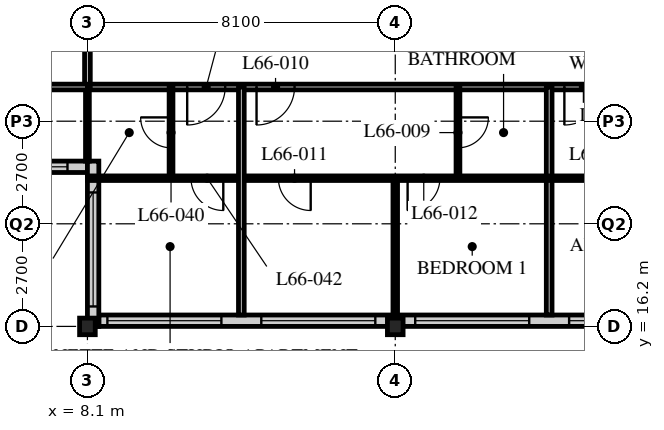
"""IFC4 building model, lengths in metres.
Left out: names, types, materials, properties, quantities, classifications, styles, units other than length and angle.
Written with IfcOpenShell. Run it as: python <this file> out.ifc"""

import sys

from ifc_helpers import new_model, si_unit, direction, frame, frame_2d, origin, origin_2d, place, context, subcontext, project, spatial, rectangle, i_section, extrude, element, fill, save


model = new_model("IFC4")
c1 = context("Model", 3, precision=1e-05, world=origin(), true_north=direction((0.0, 1.0)))
c2 = subcontext(c1, "Body", "Model", "MODEL_VIEW")
j1 = project(units=[si_unit("LENGTHUNIT", "METRE"), si_unit("PLANEANGLEUNIT", "RADIAN")], contexts=[c1])
p1 = place(None, origin())
s1 = spatial("IfcSite", under=j1, at=p1, CompositionType="ELEMENT")
p2 = place(p1, origin())
s2 = spatial("IfcBuilding", under=s1, at=p2, CompositionType="ELEMENT")
p3 = place(p2, frame((0.0, 0.0, 258.0)))
s3 = spatial("IfcBuildingStorey", under=s2, at=p3, CompositionType="ELEMENT", Elevation=258.0)
for number, where, z_axis, x_axis in (
    (1, (8.1, 16.2, 0.0), (0.0, 0.0, 1.0), (1.0, 0.0, 0.0)),
    (2, (16.2, 16.2, 0.0), (0.0, 0.0, 1.0), (1.0, 0.0, 0.0)),
):
    element("IfcColumn", number, at=place(p3, frame(where, z_axis=z_axis, x_axis=x_axis)), inside=s3, PredefinedType="COLUMN", context=c2, shape_type="SweptSolid", body=[
        extrude(i_section(OverallWidth=0.412, OverallDepth=0.437, WebThickness=0.036, FlangeThickness=0.058, FilletRadius=0.015, at=origin_2d()), origin(), (0.0, 0.0, 1.0), 3.9),
    ])
p4 = place(p3, frame((8.4, 16.35, 0.0), z_axis=(0.0, 0.0, 1.0), x_axis=(1.0, 0.0, 0.0)))
e3 = element("IfcWall", 3, at=p4, inside=s3, PredefinedType="SOLIDWALL", context=c2, shape_type="SweptSolid", body=[
    extrude(rectangle(XDim=40.2, YDim=0.3, at=frame_2d((20.1, 0.0))), origin(), (0.0, 0.0, 1.0), 3.69),
])
p5 = place(p4, frame((0.225, 0.0, 0.6)))
e4 = element("IfcOpeningElement", 4, at=p5, cuts=e3, PredefinedType="OPENING", context=c2, shape_type="SweptSolid", body=[
    extrude(rectangle(XDim=3.0, YDim=2.4, at=frame_2d((1.5, 1.2))), frame((0.0, 0.16, 0.0), z_axis=(0.0, -1.0, 0.0), x_axis=(1.0, 0.0, 0.0)), (0.0, 0.0, 1.0), 0.32),
])
p6 = place(p4, frame((4.275, 0.0, 0.6)))
e5 = element("IfcOpeningElement", 5, at=p6, cuts=e3, PredefinedType="OPENING", context=c2, shape_type="SweptSolid", body=[
    extrude(rectangle(XDim=3.0, YDim=2.4, at=frame_2d((1.5, 1.2))), frame((0.0, 0.16, 0.0), z_axis=(0.0, -1.0, 0.0), x_axis=(1.0, 0.0, 0.0)), (0.0, 0.0, 1.0), 0.32),
])
p7 = place(p4, frame((8.325, 0.0, 0.6)))
e6 = element("IfcOpeningElement", 6, at=p7, cuts=e3, PredefinedType="OPENING", context=c2, shape_type="SweptSolid", body=[
    extrude(rectangle(XDim=3.0, YDim=2.4, at=frame_2d((1.5, 1.2))), frame((0.0, 0.16, 0.0), z_axis=(0.0, -1.0, 0.0), x_axis=(1.0, 0.0, 0.0)), (0.0, 0.0, 1.0), 0.32),
])
p8 = place(p4, frame((12.375, 0.0, 0.6)))
e7 = element("IfcOpeningElement", 7, at=p8, cuts=e3, PredefinedType="OPENING", context=c2, shape_type="SweptSolid", body=[
    extrude(rectangle(XDim=3.0, YDim=2.4, at=frame_2d((1.5, 1.2))), frame((0.0, 0.16, 0.0), z_axis=(0.0, -1.0, 0.0), x_axis=(1.0, 0.0, 0.0)), (0.0, 0.0, 1.0), 0.32),
])
p9 = place(p4, frame((16.425, 0.0, 0.6)))
e8 = element("IfcOpeningElement", 8, at=p9, cuts=e3, PredefinedType="OPENING", context=c2, shape_type="SweptSolid", body=[
    extrude(rectangle(XDim=3.0, YDim=2.4, at=frame_2d((1.5, 1.2))), frame((0.0, 0.16, 0.0), z_axis=(0.0, -1.0, 0.0), x_axis=(1.0, 0.0, 0.0)), (0.0, 0.0, 1.0), 0.32),
])
p10 = place(p4, frame((20.475, 0.0, 0.6)))
e9 = element("IfcOpeningElement", 9, at=p10, cuts=e3, PredefinedType="OPENING", context=c2, shape_type="SweptSolid", body=[
    extrude(rectangle(XDim=3.0, YDim=2.4, at=frame_2d((1.5, 1.2))), frame((0.0, 0.16, 0.0), z_axis=(0.0, -1.0, 0.0), x_axis=(1.0, 0.0, 0.0)), (0.0, 0.0, 1.0), 0.32),
])
p11 = place(p4, frame((24.525, 0.0, 0.6)))
e10 = element("IfcOpeningElement", 10, at=p11, cuts=e3, PredefinedType="OPENING", context=c2, shape_type="SweptSolid", body=[
    extrude(rectangle(XDim=3.0, YDim=2.4, at=frame_2d((1.5, 1.2))), frame((0.0, 0.16, 0.0), z_axis=(0.0, -1.0, 0.0), x_axis=(1.0, 0.0, 0.0)), (0.0, 0.0, 1.0), 0.32),
])
p12 = place(p4, frame((28.575, 0.0, 0.6)))
e11 = element("IfcOpeningElement", 11, at=p12, cuts=e3, PredefinedType="OPENING", context=c2, shape_type="SweptSolid", body=[
    extrude(rectangle(XDim=3.0, YDim=2.4, at=frame_2d((1.5, 1.2))), frame((0.0, 0.16, 0.0), z_axis=(0.0, -1.0, 0.0), x_axis=(1.0, 0.0, 0.0)), (0.0, 0.0, 1.0), 0.32),
])
p13 = place(p4, frame((32.625, 0.0, 0.6)))
e12 = element("IfcOpeningElement", 12, at=p13, cuts=e3, PredefinedType="OPENING", context=c2, shape_type="SweptSolid", body=[
    extrude(rectangle(XDim=3.0, YDim=2.4, at=frame_2d((1.5, 1.2))), frame((0.0, 0.16, 0.0), z_axis=(0.0, -1.0, 0.0), x_axis=(1.0, 0.0, 0.0)), (0.0, 0.0, 1.0), 0.32),
])
p14 = place(p4, frame((36.675, 0.0, 0.6)))
e13 = element("IfcOpeningElement", 13, at=p14, cuts=e3, PredefinedType="OPENING", context=c2, shape_type="SweptSolid", body=[
    extrude(rectangle(XDim=3.0, YDim=2.4, at=frame_2d((1.5, 1.2))), frame((0.0, 0.16, 0.0), z_axis=(0.0, -1.0, 0.0), x_axis=(1.0, 0.0, 0.0)), (0.0, 0.0, 1.0), 0.32),
])
p15 = place(p3, frame((4.35, 20.4, 0.0), z_axis=(0.0, 0.0, 1.0), x_axis=(1.0, 0.0, 0.0)))
e14 = element("IfcWall", 14, at=p15, inside=s3, PredefinedType="SOLIDWALL", context=c2, shape_type="SweptSolid", body=[
    extrude(rectangle(XDim=3.75, YDim=0.3, at=frame_2d((1.875, 0.0))), origin(), (0.0, 0.0, 1.0), 3.69),
])
p16 = place(p15, frame((0.225, 0.0, 0.6)))
e15 = element("IfcOpeningElement", 15, at=p16, cuts=e14, PredefinedType="OPENING", context=c2, shape_type="SweptSolid", body=[
    extrude(rectangle(XDim=3.0, YDim=2.3, at=frame_2d((1.5, 1.15))), frame((0.0, 0.16, 0.0), z_axis=(0.0, -1.0, 0.0), x_axis=(1.0, 0.0, 0.0)), (0.0, 0.0, 1.0), 0.32),
])
p17 = place(p3, frame((8.25, 20.55, 0.0), z_axis=(0.0, 0.0, 1.0), x_axis=(0.0, -1.0, 0.0)))
e16 = element("IfcWall", 16, at=p17, inside=s3, PredefinedType="SOLIDWALL", context=c2, shape_type="SweptSolid", body=[
    extrude(rectangle(XDim=4.35, YDim=0.3, at=frame_2d((2.175, 0.0))), origin(), (0.0, 0.0, 1.0), 3.69),
])
p18 = place(p17, frame((0.825, 0.0, 0.6)))
e17 = element("IfcOpeningElement", 17, at=p18, cuts=e16, PredefinedType="OPENING", context=c2, shape_type="SweptSolid", body=[
    extrude(rectangle(XDim=3.0, YDim=2.3, at=frame_2d((1.5, 1.15))), frame((0.0, 0.16, 0.0), z_axis=(0.0, -1.0, 0.0), x_axis=(1.0, 0.0, 0.0)), (0.0, 0.0, 1.0), 0.32),
])
p19 = place(p3, frame((8.1, 22.5, 0.0), z_axis=(0.0, 0.0, 1.0), x_axis=(1.0, 0.0, 0.0)))
e18 = element("IfcWall", 18, at=p19, inside=s3, PredefinedType="PARTITIONING", context=c2, shape_type="SweptSolid", body=[
    extrude(rectangle(XDim=28.35, YDim=0.15, at=frame_2d((14.175, 0.0))), origin(), (0.0, 0.0, 1.0), 3.69),
])
p20 = place(p19, frame((4.45, 0.0, 0.0)))
e19 = element("IfcOpeningElement", 19, at=p20, cuts=e18, PredefinedType="OPENING", context=c2, shape_type="SweptSolid", body=[
    extrude(rectangle(XDim=1.0, YDim=2.1, at=frame_2d((0.5, 1.05))), frame((0.0, 0.085, 0.0), z_axis=(0.0, -1.0, 0.0), x_axis=(1.0, 0.0, 0.0)), (0.0, 0.0, 1.0), 0.17),
])
p21 = place(p19, frame((12.55, 0.0, 0.0)))
e20 = element("IfcOpeningElement", 20, at=p21, cuts=e18, PredefinedType="OPENING", context=c2, shape_type="SweptSolid", body=[
    extrude(rectangle(XDim=1.0, YDim=2.1, at=frame_2d((0.5, 1.05))), frame((0.0, 0.085, 0.0), z_axis=(0.0, -1.0, 0.0), x_axis=(1.0, 0.0, 0.0)), (0.0, 0.0, 1.0), 0.17),
])
p22 = place(p19, frame((20.65, 0.0, 0.0)))
e21 = element("IfcOpeningElement", 21, at=p22, cuts=e18, PredefinedType="OPENING", context=c2, shape_type="SweptSolid", body=[
    extrude(rectangle(XDim=1.0, YDim=2.1, at=frame_2d((0.5, 1.05))), frame((0.0, 0.085, 0.0), z_axis=(0.0, -1.0, 0.0), x_axis=(1.0, 0.0, 0.0)), (0.0, 0.0, 1.0), 0.17),
])
p23 = place(p19, frame((2.625, 0.0, 0.0)))
e22 = element("IfcOpeningElement", 22, at=p23, cuts=e18, PredefinedType="OPENING", context=c2, shape_type="SweptSolid", body=[
    extrude(rectangle(XDim=1.0, YDim=2.1, at=frame_2d((0.5, 1.05))), frame((0.0, 0.085, 0.0), z_axis=(0.0, -1.0, 0.0), x_axis=(1.0, 0.0, 0.0)), (0.0, 0.0, 1.0), 0.17),
])
p24 = place(p3, frame((8.1, 22.5, 0.0), z_axis=(0.0, 0.0, 1.0), x_axis=(0.0, 1.0, 0.0)))
e23 = element("IfcWall", 23, at=p24, inside=s3, PredefinedType="PARTITIONING", context=c2, shape_type="SweptSolid", body=[
    extrude(rectangle(XDim=26.1, YDim=0.15, at=frame_2d((13.05, 0.0))), origin(), (0.0, 0.0, 1.0), 3.078),
])
p25 = place(p24, frame((2.65, 0.0, 0.0)))
e24 = element("IfcOpeningElement", 24, at=p25, cuts=e23, PredefinedType="OPENING", context=c2, shape_type="SweptSolid", body=[
    extrude(rectangle(XDim=1.0, YDim=2.1, at=frame_2d((0.5, 1.05))), frame((0.0, 0.085, 0.0), z_axis=(0.0, -1.0, 0.0), x_axis=(1.0, 0.0, 0.0)), (0.0, 0.0, 1.0), 0.17),
])
p26 = place(p24, frame((22.75, 0.0, 0.0)))
e25 = element("IfcOpeningElement", 25, at=p26, cuts=e23, PredefinedType="OPENING", context=c2, shape_type="SweptSolid", body=[
    extrude(rectangle(XDim=1.0, YDim=2.1, at=frame_2d((0.5, 1.05))), frame((0.0, 0.085, 0.0), z_axis=(0.0, -1.0, 0.0), x_axis=(1.0, 0.0, 0.0)), (0.0, 0.0, 1.0), 0.17),
])
p27 = place(p3, frame((17.85, 22.5, 0.0), z_axis=(0.0, 0.0, 1.0), x_axis=(0.0, -1.0, 0.0)))
e26 = element("IfcWall", 26, at=p27, inside=s3, PredefinedType="PARTITIONING", context=c2, shape_type="SweptSolid", body=[
    extrude(rectangle(XDim=2.4, YDim=0.1, at=frame_2d((1.2, 0.0))), origin(), (0.0, 0.0, 1.0), 3.69),
])
p28 = place(p27, frame((0.8, 0.0, 0.0)))
e27 = element("IfcOpeningElement", 27, at=p28, cuts=e26, PredefinedType="OPENING", context=c2, shape_type="SweptSolid", body=[
    extrude(rectangle(XDim=0.8, YDim=2.1, at=frame_2d((0.4, 1.05))), frame((0.0, 0.06, 0.0), z_axis=(0.0, -1.0, 0.0), x_axis=(1.0, 0.0, 0.0)), (0.0, 0.0, 1.0), 0.12),
])
p29 = place(p3, frame((16.2, 20.1, 0.0), z_axis=(0.0, 0.0, 1.0), x_axis=(0.0, -1.0, 0.0)))
e28 = element("IfcWall", 28, at=p29, inside=s3, PredefinedType="PARTITIONING", context=c2, shape_type="SweptSolid", body=[
    extrude(rectangle(XDim=3.6, YDim=0.12, at=frame_2d((1.8, 0.0))), origin(), (0.0, 0.0, 1.0), 3.078),
])
p30 = place(p3, frame((20.25, 22.5, 0.0), z_axis=(0.0, 0.0, 1.0), x_axis=(0.0, -1.0, 0.0)))
e29 = element("IfcWall", 29, at=p30, inside=s3, PredefinedType="PARTITIONING", context=c2, shape_type="SweptSolid", body=[
    extrude(rectangle(XDim=6.0, YDim=0.15, at=frame_2d((3.0, 0.0))), origin(), (0.0, 0.0, 1.0), 3.69),
])
p31 = place(p3, frame((8.1, 20.1, 0.0), z_axis=(0.0, 0.0, 1.0), x_axis=(1.0, 0.0, 0.0)))
e30 = element("IfcWall", 30, at=p31, inside=s3, PredefinedType="PARTITIONING", context=c2, shape_type="SweptSolid", body=[
    extrude(rectangle(XDim=28.35, YDim=0.12, at=frame_2d((14.175, 0.0))), origin(), (0.0, 0.0, 1.0), 3.69),
])
p32 = place(p31, frame((5.025, 0.0, 0.0)))
e31 = element("IfcOpeningElement", 31, at=p32, cuts=e30, PredefinedType="OPENING", context=c2, shape_type="SweptSolid", body=[
    extrude(rectangle(XDim=0.85, YDim=2.1, at=frame_2d((0.425, 1.05))), frame((0.0, 0.07, 0.0), z_axis=(0.0, -1.0, 0.0), x_axis=(1.0, 0.0, 0.0)), (0.0, 0.0, 1.0), 0.14),
])
p33 = place(p31, frame((8.425, 0.0, 0.0)))
e32 = element("IfcOpeningElement", 32, at=p33, cuts=e30, PredefinedType="OPENING", context=c2, shape_type="SweptSolid", body=[
    extrude(rectangle(XDim=0.85, YDim=2.1, at=frame_2d((0.425, 1.05))), frame((0.0, 0.07, 0.0), z_axis=(0.0, -1.0, 0.0), x_axis=(1.0, 0.0, 0.0)), (0.0, 0.0, 1.0), 0.14),
])
p34 = place(p31, frame((13.125, 0.0, 0.0)))
e33 = element("IfcOpeningElement", 33, at=p34, cuts=e30, PredefinedType="OPENING", context=c2, shape_type="SweptSolid", body=[
    extrude(rectangle(XDim=0.85, YDim=2.1, at=frame_2d((0.425, 1.05))), frame((0.0, 0.07, 0.0), z_axis=(0.0, -1.0, 0.0), x_axis=(1.0, 0.0, 0.0)), (0.0, 0.0, 1.0), 0.14),
])
p35 = place(p31, frame((16.525, 0.0, 0.0)))
e34 = element("IfcOpeningElement", 34, at=p35, cuts=e30, PredefinedType="OPENING", context=c2, shape_type="SweptSolid", body=[
    extrude(rectangle(XDim=0.85, YDim=2.1, at=frame_2d((0.425, 1.05))), frame((0.0, 0.07, 0.0), z_axis=(0.0, -1.0, 0.0), x_axis=(1.0, 0.0, 0.0)), (0.0, 0.0, 1.0), 0.14),
])
p36 = place(p31, frame((21.225, 0.0, 0.0)))
e35 = element("IfcOpeningElement", 35, at=p36, cuts=e30, PredefinedType="OPENING", context=c2, shape_type="SweptSolid", body=[
    extrude(rectangle(XDim=0.85, YDim=2.1, at=frame_2d((0.425, 1.05))), frame((0.0, 0.07, 0.0), z_axis=(0.0, -1.0, 0.0), x_axis=(1.0, 0.0, 0.0)), (0.0, 0.0, 1.0), 0.14),
])
p37 = place(p31, frame((24.625, 0.0, 0.0)))
e36 = element("IfcOpeningElement", 36, at=p37, cuts=e30, PredefinedType="OPENING", context=c2, shape_type="SweptSolid", body=[
    extrude(rectangle(XDim=0.85, YDim=2.1, at=frame_2d((0.425, 1.05))), frame((0.0, 0.07, 0.0), z_axis=(0.0, -1.0, 0.0), x_axis=(1.0, 0.0, 0.0)), (0.0, 0.0, 1.0), 0.14),
])
p38 = place(p31, frame((2.725, 0.0, 0.0)))
e37 = element("IfcOpeningElement", 37, at=p38, cuts=e30, PredefinedType="OPENING", context=c2, shape_type="SweptSolid", body=[
    extrude(rectangle(XDim=0.85, YDim=2.1, at=frame_2d((0.425, 1.05))), frame((0.0, 0.07, 0.0), z_axis=(0.0, -1.0, 0.0), x_axis=(1.0, 0.0, 0.0)), (0.0, 0.0, 1.0), 0.14),
])
p39 = place(p3, frame((10.3, 22.5, 0.0), z_axis=(0.0, 0.0, 1.0), x_axis=(0.0, -1.0, 0.0)))
e38 = element("IfcWall", 38, at=p39, inside=s3, PredefinedType="PARTITIONING", context=c2, shape_type="SweptSolid", body=[
    extrude(rectangle(XDim=2.4, YDim=0.1, at=frame_2d((1.2, 0.0))), origin(), (0.0, 0.0, 1.0), 3.69),
])
p40 = place(p39, frame((0.8, 0.0, 0.0)))
e39 = element("IfcOpeningElement", 39, at=p40, cuts=e38, PredefinedType="OPENING", context=c2, shape_type="SweptSolid", body=[
    extrude(rectangle(XDim=0.8, YDim=2.1, at=frame_2d((0.4, 1.05))), frame((0.0, 0.06, 0.0), z_axis=(0.0, -1.0, 0.0), x_axis=(1.0, 0.0, 0.0)), (0.0, 0.0, 1.0), 0.12),
])
p41 = place(p3, frame((8.1, 22.5, 0.0), z_axis=(0.0, 0.0, 1.0), x_axis=(0.0, -1.0, 0.0)))
e40 = element("IfcWall", 40, at=p41, inside=s3, PredefinedType="PARTITIONING", context=c2, shape_type="SweptSolid", body=[
    extrude(rectangle(XDim=1.95, YDim=0.1, at=frame_2d((0.975, 0.0))), origin(), (0.0, 0.0, 1.0), 3.078),
])
p42 = place(p3, frame((4.35, 22.5, 0.0), z_axis=(0.0, 0.0, 1.0), x_axis=(1.0, 0.0, 0.0)))
e41 = element("IfcWall", 41, at=p42, inside=s3, PredefinedType="PARTITIONING", context=c2, shape_type="SweptSolid", body=[
    extrude(rectangle(XDim=3.75, YDim=0.15, at=frame_2d((1.875, 0.0))), origin(), (0.0, 0.0, 1.0), 3.69),
])
p43 = place(p3, frame((12.15, 22.5, 0.0), z_axis=(0.0, 0.0, 1.0), x_axis=(0.0, -1.0, 0.0)))
e42 = element("IfcWall", 42, at=p43, inside=s3, PredefinedType="PARTITIONING", context=c2, shape_type="SweptSolid", body=[
    extrude(rectangle(XDim=6.0, YDim=0.15, at=frame_2d((3.0, 0.0))), origin(), (0.0, 0.0, 1.0), 3.69),
])
p44 = place(p5, origin())
e43 = element("IfcWindow", 43, at=p44, inside=s3, PartitioningType="SINGLE_PANEL", PredefinedType="WINDOW", context=c2, shape_type="SweptSolid", body=[
    extrude(rectangle(XDim=3.0, YDim=2.4, at=frame_2d((1.5, 1.2))), frame((0.0, 0.03, 0.0), z_axis=(0.0, -1.0, 0.0), x_axis=(1.0, 0.0, 0.0)), (0.0, 0.0, 1.0), 0.06),
])
fill(e4, e43)
p45 = place(p6, origin())
e44 = element("IfcWindow", 44, at=p45, inside=s3, PartitioningType="SINGLE_PANEL", PredefinedType="WINDOW", context=c2, shape_type="SweptSolid", body=[
    extrude(rectangle(XDim=3.0, YDim=2.4, at=frame_2d((1.5, 1.2))), frame((0.0, 0.03, 0.0), z_axis=(0.0, -1.0, 0.0), x_axis=(1.0, 0.0, 0.0)), (0.0, 0.0, 1.0), 0.06),
])
fill(e5, e44)
p46 = place(p7, origin())
e45 = element("IfcWindow", 45, at=p46, inside=s3, PartitioningType="SINGLE_PANEL", PredefinedType="WINDOW", context=c2, shape_type="SweptSolid", body=[
    extrude(rectangle(XDim=3.0, YDim=2.4, at=frame_2d((1.5, 1.2))), frame((0.0, 0.03, 0.0), z_axis=(0.0, -1.0, 0.0), x_axis=(1.0, 0.0, 0.0)), (0.0, 0.0, 1.0), 0.06),
])
fill(e6, e45)
p47 = place(p8, origin())
e46 = element("IfcWindow", 46, at=p47, inside=s3, PartitioningType="SINGLE_PANEL", PredefinedType="WINDOW", context=c2, shape_type="SweptSolid", body=[
    extrude(rectangle(XDim=3.0, YDim=2.4, at=frame_2d((1.5, 1.2))), frame((0.0, 0.03, 0.0), z_axis=(0.0, -1.0, 0.0), x_axis=(1.0, 0.0, 0.0)), (0.0, 0.0, 1.0), 0.06),
])
fill(e7, e46)
p48 = place(p16, origin())
e47 = element("IfcWindow", 47, at=p48, inside=s3, PartitioningType="SINGLE_PANEL", PredefinedType="WINDOW", context=c2, shape_type="SweptSolid", body=[
    extrude(rectangle(XDim=3.0, YDim=2.3, at=frame_2d((1.5, 1.15))), frame((0.0, 0.03, 0.0), z_axis=(0.0, -1.0, 0.0), x_axis=(1.0, 0.0, 0.0)), (0.0, 0.0, 1.0), 0.06),
])
fill(e15, e47)
p49 = place(p18, origin())
e48 = element("IfcWindow", 48, at=p49, inside=s3, PartitioningType="SINGLE_PANEL", PredefinedType="WINDOW", context=c2, shape_type="SweptSolid", body=[
    extrude(rectangle(XDim=3.0, YDim=2.3, at=frame_2d((1.5, 1.15))), frame((0.0, 0.03, 0.0), z_axis=(0.0, -1.0, 0.0), x_axis=(1.0, 0.0, 0.0)), (0.0, 0.0, 1.0), 0.06),
])
fill(e17, e48)
p50 = place(p28, origin())
e49 = element("IfcDoor", 49, at=p50, inside=s3, OperationType="SINGLE_SWING_LEFT", PredefinedType="DOOR", context=c2, shape_type="SweptSolid", body=[
    extrude(rectangle(XDim=0.8, YDim=2.1, at=frame_2d((0.4, 1.05))), frame((0.0, 0.025, 0.0), z_axis=(0.0, -1.0, 0.0), x_axis=(1.0, 0.0, 0.0)), (0.0, 0.0, 1.0), 0.05),
])
fill(e27, e49)
p51 = place(p20, origin())
e50 = element("IfcDoor", 50, at=p51, inside=s3, OperationType="SINGLE_SWING_RIGHT", PredefinedType="DOOR", context=c2, shape_type="SweptSolid", body=[
    extrude(rectangle(XDim=1.0, YDim=2.1, at=frame_2d((0.5, 1.05))), frame((0.0, 0.025, 0.0), z_axis=(0.0, -1.0, 0.0), x_axis=(1.0, 0.0, 0.0)), (0.0, 0.0, 1.0), 0.05),
])
fill(e19, e50)
p52 = place(p32, origin())
e51 = element("IfcDoor", 51, at=p52, inside=s3, OperationType="SINGLE_SWING_LEFT", PredefinedType="DOOR", context=c2, shape_type="SweptSolid", body=[
    extrude(rectangle(XDim=0.85, YDim=2.1, at=frame_2d((0.425, 1.05))), frame((0.0, 0.025, 0.0), z_axis=(0.0, -1.0, 0.0), x_axis=(1.0, 0.0, 0.0)), (0.0, 0.0, 1.0), 0.05),
])
fill(e31, e51)
p53 = place(p33, origin())
e52 = element("IfcDoor", 52, at=p53, inside=s3, OperationType="SINGLE_SWING_RIGHT", PredefinedType="DOOR", context=c2, shape_type="SweptSolid", body=[
    extrude(rectangle(XDim=0.85, YDim=2.1, at=frame_2d((0.425, 1.05))), frame((0.0, 0.025, 0.0), z_axis=(0.0, -1.0, 0.0), x_axis=(1.0, 0.0, 0.0)), (0.0, 0.0, 1.0), 0.05),
])
fill(e32, e52)
p54 = place(p21, origin())
e53 = element("IfcDoor", 53, at=p54, inside=s3, OperationType="SINGLE_SWING_RIGHT", PredefinedType="DOOR", context=c2, shape_type="SweptSolid", body=[
    extrude(rectangle(XDim=1.0, YDim=2.1, at=frame_2d((0.5, 1.05))), frame((0.0, 0.025, 0.0), z_axis=(0.0, -1.0, 0.0), x_axis=(1.0, 0.0, 0.0)), (0.0, 0.0, 1.0), 0.05),
])
fill(e20, e53)
p55 = place(p40, origin())
e54 = element("IfcDoor", 54, at=p55, inside=s3, OperationType="SINGLE_SWING_RIGHT", PredefinedType="DOOR", context=c2, shape_type="SweptSolid", body=[
    extrude(rectangle(XDim=0.8, YDim=2.1, at=frame_2d((0.4, 1.05))), frame((0.0, 0.025, 0.0), z_axis=(0.0, -1.0, 0.0), x_axis=(1.0, 0.0, 0.0)), (0.0, 0.0, 1.0), 0.05),
])
fill(e39, e54)
p56 = place(p23, origin())
e55 = element("IfcDoor", 55, at=p56, inside=s3, OperationType="SINGLE_SWING_RIGHT", PredefinedType="DOOR", context=c2, shape_type="SweptSolid", body=[
    extrude(rectangle(XDim=1.0, YDim=2.1, at=frame_2d((0.5, 1.05))), frame((0.0, 0.025, 0.0), z_axis=(0.0, -1.0, 0.0), x_axis=(1.0, 0.0, 0.0)), (0.0, 0.0, 1.0), 0.05),
])
fill(e22, e55)
p57 = place(p38, origin())
e56 = element("IfcDoor", 56, at=p57, inside=s3, OperationType="SINGLE_SWING_LEFT", PredefinedType="DOOR", context=c2, shape_type="SweptSolid", body=[
    extrude(rectangle(XDim=0.85, YDim=2.1, at=frame_2d((0.425, 1.05))), frame((0.0, 0.025, 0.0), z_axis=(0.0, -1.0, 0.0), x_axis=(1.0, 0.0, 0.0)), (0.0, 0.0, 1.0), 0.05),
])
fill(e37, e56)
save(model, sys.argv[1])
